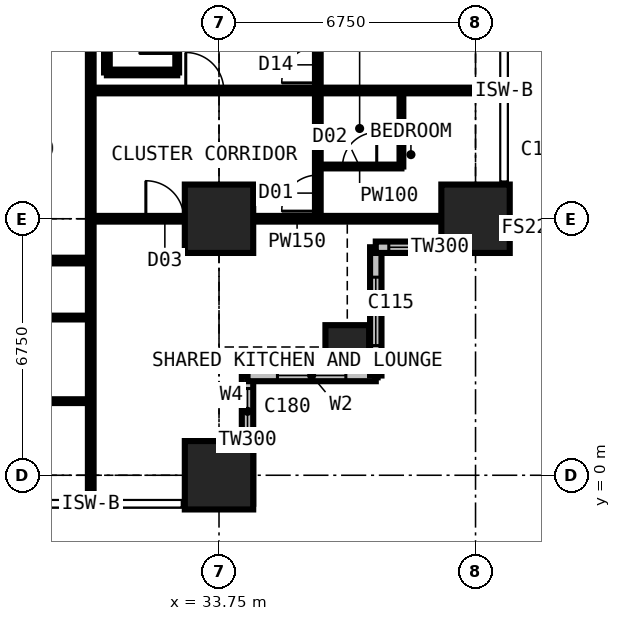
"""IFC4 building model, lengths in metres.
Left out: names, types, materials, properties, quantities, classifications, styles, units other than length and angle.
Written with IfcOpenShell. Run it as: python <this file> out.ifc"""

import sys

from ifc_helpers import new_model, si_unit, direction, frame, frame_2d, origin, origin_2d, place, context, subcontext, project, spatial, rectangle, extrude, element, fill, save


model = new_model("IFC4")
c1 = context("Model", 3, precision=1e-05, world=origin(), true_north=direction((0.0, 1.0)))
c2 = subcontext(c1, "Body", "Model", "MODEL_VIEW")
j1 = project(units=[si_unit("LENGTHUNIT", "METRE"), si_unit("PLANEANGLEUNIT", "RADIAN")], contexts=[c1])
p1 = place(None, origin())
s1 = spatial("IfcSite", under=j1, at=p1, CompositionType="ELEMENT")
p2 = place(p1, origin())
s2 = spatial("IfcBuilding", under=s1, at=p2, CompositionType="ELEMENT")
p3 = place(p2, frame((0.0, 0.0, 90.9)))
s3 = spatial("IfcBuildingStorey", under=s2, at=p3, CompositionType="ELEMENT", Elevation=90.9)
for number, where, z_axis, x_axis in (
    (1, (33.75, 0.0, 0.0), (0.0, 0.0, 1.0), (1.0, 0.0, 0.0)),
    (2, (33.75, 6.75, 0.0), (0.0, 0.0, 1.0), (1.0, 0.0, 0.0)),
):
    element("IfcColumn", number, at=place(p3, frame(where, z_axis=z_axis, x_axis=x_axis)), inside=s3, PredefinedType="COLUMN", context=c2, shape_type="SweptSolid", body=[
        extrude(rectangle(XDim=1.8, YDim=1.8, at=origin_2d()), origin(), (0.0, 0.0, 1.0), 3.6),
    ])
p4 = place(p3, frame((37.125, 3.375, 0.0), z_axis=(0.0, 0.0, 1.0), x_axis=(1.0, 0.0, 0.0)))
e3 = element("IfcColumn", 3, at=p4, inside=s3, PredefinedType="COLUMN", context=c2, shape_type="SweptSolid", body=[
    extrude(rectangle(XDim=1.15, YDim=1.15, at=origin_2d()), origin(), (0.0, 0.0, 1.0), 3.6),
])
p5 = place(p3, frame((40.5, 6.75, 0.0), z_axis=(0.0, 0.0, 1.0), x_axis=(1.0, 0.0, 0.0)))
e4 = element("IfcColumn", 4, at=p5, inside=s3, PredefinedType="COLUMN", context=c2, shape_type="SweptSolid", body=[
    extrude(rectangle(XDim=1.8, YDim=1.8, at=origin_2d()), origin(), (0.0, 0.0, 1.0), 3.6),
])
p6 = place(p3, frame((34.5, -0.75, 0.0), z_axis=(0.0, 0.0, 1.0), x_axis=(0.0, 1.0, 0.0)))
e5 = element("IfcWall", 5, at=p6, inside=s3, PredefinedType="SOLIDWALL", context=c2, shape_type="SweptSolid", body=[
    extrude(rectangle(XDim=3.375, YDim=0.3, at=frame_2d((1.688, 0.0))), origin(), (0.0, 0.0, 1.0), 3.375),
])
p7 = place(p6, frame((1.833, 0.0, 0.9)))
e6 = element("IfcOpeningElement", 6, at=p7, cuts=e5, PredefinedType="OPENING", context=c2, shape_type="SweptSolid", body=[
    extrude(rectangle(XDim=1.2, YDim=1.8, at=frame_2d((0.6, 0.9))), frame((0.0, 0.16, 0.0), z_axis=(0.0, -1.0, 0.0), x_axis=(1.0, 0.0, 0.0)), (0.0, 0.0, 1.0), 0.32),
])
p8 = place(p3, frame((34.5, 2.625, 0.0), z_axis=(0.0, 0.0, 1.0), x_axis=(1.0, 0.0, 0.0)))
e7 = element("IfcWall", 7, at=p8, inside=s3, PredefinedType="SOLIDWALL", context=c2, shape_type="SweptSolid", body=[
    extrude(rectangle(XDim=3.375, YDim=0.3, at=frame_2d((1.688, 0.0))), origin(), (0.0, 0.0, 1.0), 3.375),
])
p9 = place(p8, frame((0.788, 0.0, 0.6)))
e8 = element("IfcOpeningElement", 8, at=p9, cuts=e7, PredefinedType="OPENING", context=c2, shape_type="SweptSolid", body=[
    extrude(rectangle(XDim=1.8, YDim=2.1, at=frame_2d((0.9, 1.05))), frame((0.0, 0.16, 0.0), z_axis=(0.0, -1.0, 0.0), x_axis=(1.0, 0.0, 0.0)), (0.0, 0.0, 1.0), 0.32),
])
p10 = place(p3, frame((37.875, 2.625, 0.0), z_axis=(0.0, 0.0, 1.0), x_axis=(0.0, 1.0, 0.0)))
e9 = element("IfcWall", 9, at=p10, inside=s3, PredefinedType="SOLIDWALL", context=c2, shape_type="SweptSolid", body=[
    extrude(rectangle(XDim=3.375, YDim=0.3, at=frame_2d((1.688, 0.0))), origin(), (0.0, 0.0, 1.0), 3.375),
])
p11 = place(p10, frame((0.788, 0.0, 0.6)))
e10 = element("IfcOpeningElement", 10, at=p11, cuts=e9, PredefinedType="OPENING", context=c2, shape_type="SweptSolid", body=[
    extrude(rectangle(XDim=1.8, YDim=2.1, at=frame_2d((0.9, 1.05))), frame((0.0, 0.16, 0.0), z_axis=(0.0, -1.0, 0.0), x_axis=(1.0, 0.0, 0.0)), (0.0, 0.0, 1.0), 0.32),
])
p12 = place(p3, frame((37.875, 6.0, 0.0), z_axis=(0.0, 0.0, 1.0), x_axis=(1.0, 0.0, 0.0)))
e11 = element("IfcWall", 11, at=p12, inside=s3, PredefinedType="SOLIDWALL", context=c2, shape_type="SweptSolid", body=[
    extrude(rectangle(XDim=3.375, YDim=0.3, at=frame_2d((1.688, 0.0))), origin(), (0.0, 0.0, 1.0), 3.375),
])
p13 = place(p12, frame((0.343, 0.0, 0.9)))
e12 = element("IfcOpeningElement", 12, at=p13, cuts=e11, PredefinedType="OPENING", context=c2, shape_type="SweptSolid", body=[
    extrude(rectangle(XDim=1.2, YDim=1.8, at=frame_2d((0.6, 0.9))), frame((0.0, 0.16, 0.0), z_axis=(0.0, -1.0, 0.0), x_axis=(1.0, 0.0, 0.0)), (0.0, 0.0, 1.0), 0.32),
])
p14 = place(p3, frame((6.75, 4.15, 0.0), z_axis=(0.0, 0.0, 1.0), x_axis=(1.0, 0.0, 0.0)))
e13 = element("IfcWall", 13, at=p14, inside=s3, PredefinedType="PARTITIONING", context=c2, shape_type="SweptSolid", body=[
    extrude(rectangle(XDim=23.625, YDim=0.1, at=frame_2d((11.812, 0.0))), origin(), (0.0, 0.0, 1.0), 3.375),
])
p15 = place(p14, frame((2.85, 0.0, 0.0)))
e14 = element("IfcOpeningElement", 14, at=p15, cuts=e13, PredefinedType="OPENING", context=c2, shape_type="SweptSolid", body=[
    extrude(rectangle(XDim=1.0, YDim=2.2, at=frame_2d((0.5, 1.1))), frame((0.0, 0.06, 0.0), z_axis=(0.0, -1.0, 0.0), x_axis=(1.0, 0.0, 0.0)), (0.0, 0.0, 1.0), 0.12),
])
p16 = place(p14, frame((6.95, 0.0, 0.0)))
e15 = element("IfcOpeningElement", 15, at=p16, cuts=e13, PredefinedType="OPENING", context=c2, shape_type="SweptSolid", body=[
    extrude(rectangle(XDim=0.95, YDim=2.2, at=frame_2d((0.475, 1.1))), frame((0.0, 0.06, 0.0), z_axis=(0.0, -1.0, 0.0), x_axis=(1.0, 0.0, 0.0)), (0.0, 0.0, 1.0), 0.12),
])
p17 = place(p14, frame((10.375, 0.0, 0.0)))
e16 = element("IfcOpeningElement", 16, at=p17, cuts=e13, PredefinedType="OPENING", context=c2, shape_type="SweptSolid", body=[
    extrude(rectangle(XDim=0.95, YDim=2.2, at=frame_2d((0.475, 1.1))), frame((0.0, 0.06, 0.0), z_axis=(0.0, -1.0, 0.0), x_axis=(1.0, 0.0, 0.0)), (0.0, 0.0, 1.0), 0.12),
])
p18 = place(p14, frame((13.7, 0.0, 0.0)))
e17 = element("IfcOpeningElement", 17, at=p18, cuts=e13, PredefinedType="OPENING", context=c2, shape_type="SweptSolid", body=[
    extrude(rectangle(XDim=0.95, YDim=2.2, at=frame_2d((0.475, 1.1))), frame((0.0, 0.06, 0.0), z_axis=(0.0, -1.0, 0.0), x_axis=(1.0, 0.0, 0.0)), (0.0, 0.0, 1.0), 0.12),
])
p19 = place(p14, frame((17.125, 0.0, 0.0)))
e18 = element("IfcOpeningElement", 18, at=p19, cuts=e13, PredefinedType="OPENING", context=c2, shape_type="SweptSolid", body=[
    extrude(rectangle(XDim=0.95, YDim=2.2, at=frame_2d((0.475, 1.1))), frame((0.0, 0.06, 0.0), z_axis=(0.0, -1.0, 0.0), x_axis=(1.0, 0.0, 0.0)), (0.0, 0.0, 1.0), 0.12),
])
p20 = place(p14, frame((20.5, 0.0, 0.0)))
e19 = element("IfcOpeningElement", 19, at=p20, cuts=e13, PredefinedType="OPENING", context=c2, shape_type="SweptSolid", body=[
    extrude(rectangle(XDim=0.95, YDim=2.2, at=frame_2d((0.475, 1.1))), frame((0.0, 0.06, 0.0), z_axis=(0.0, -1.0, 0.0), x_axis=(1.0, 0.0, 0.0)), (0.0, 0.0, 1.0), 0.12),
])
p21 = place(p3, frame((22.988, 5.65, 0.0), z_axis=(0.0, 0.0, 1.0), x_axis=(1.0, 0.0, 0.0)))
e20 = element("IfcWall", 20, at=p21, inside=s3, PredefinedType="PARTITIONING", context=c2, shape_type="SweptSolid", body=[
    extrude(rectangle(XDim=7.387, YDim=0.15, at=frame_2d((3.694, 0.0))), origin(), (0.0, 0.0, 1.0), 3.375),
])
p22 = place(p21, frame((2.15, 0.0, 0.0)))
e21 = element("IfcOpeningElement", 21, at=p22, cuts=e20, PredefinedType="OPENING", context=c2, shape_type="SweptSolid", body=[
    extrude(rectangle(XDim=0.95, YDim=2.2, at=frame_2d((0.475, 1.1))), frame((0.0, 0.085, 0.0), z_axis=(0.0, -1.0, 0.0), x_axis=(1.0, 0.0, 0.0)), (0.0, 0.0, 1.0), 0.17),
])
p23 = place(p3, frame((28.375, 1.95, 0.0), z_axis=(0.0, 0.0, 1.0), x_axis=(1.0, 0.0, 0.0)))
e22 = element("IfcWall", 22, at=p23, inside=s3, PredefinedType="PARTITIONING", context=c2, shape_type="SweptSolid", body=[
    extrude(rectangle(XDim=2.0, YDim=0.1, at=frame_2d((1.0, 0.0))), origin(), (0.0, 0.0, 1.0), 3.375),
])
p24 = place(p3, frame((30.375, -0.734, 0.0), z_axis=(0.0, 0.0, 1.0), x_axis=(0.0, 1.0, 0.0)))
e23 = element("IfcWall", 23, at=p24, inside=s3, PredefinedType="PARTITIONING", context=c2, shape_type="SweptSolid", body=[
    extrude(rectangle(XDim=12.034, YDim=0.15, at=frame_2d((6.017, 0.0))), origin(), (0.0, 0.0, 1.0), 3.375),
])
p25 = place(p3, frame((30.375, 6.75, 0.0), z_axis=(0.0, 0.0, 1.0), x_axis=(1.0, 0.0, 0.0)))
e24 = element("IfcWall", 24, at=p25, inside=s3, PredefinedType="PARTITIONING", context=c2, shape_type="SweptSolid", body=[
    extrude(rectangle(XDim=10.859, YDim=0.15, at=frame_2d((5.429, 0.0))), origin(), (0.0, 0.0, 1.0), 2.877),
])
p26 = place(p25, frame((1.45, 0.0, 0.0)))
e25 = element("IfcOpeningElement", 25, at=p26, cuts=e24, PredefinedType="OPENING", context=c2, shape_type="SweptSolid", body=[
    extrude(rectangle(XDim=1.0, YDim=2.2, at=frame_2d((0.5, 1.1))), frame((0.0, 0.085, 0.0), z_axis=(0.0, -1.0, 0.0), x_axis=(1.0, 0.0, 0.0)), (0.0, 0.0, 1.0), 0.17),
])
p27 = place(p3, frame((30.375, 10.125, 0.0), z_axis=(0.0, 0.0, 1.0), x_axis=(1.0, 0.0, 0.0)))
e26 = element("IfcWall", 26, at=p27, inside=s3, PredefinedType="PARTITIONING", context=c2, shape_type="SweptSolid", body=[
    extrude(rectangle(XDim=10.859, YDim=0.15, at=frame_2d((5.429, 0.0))), origin(), (0.0, 0.0, 1.0), 3.375),
])
p28 = place(p27, frame((2.5, 0.0, 0.0)))
e27 = element("IfcOpeningElement", 27, at=p28, cuts=e26, PredefinedType="OPENING", context=c2, shape_type="SweptSolid", body=[
    extrude(rectangle(XDim=1.0, YDim=2.2, at=frame_2d((0.5, 1.1))), frame((0.0, 0.085, 0.0), z_axis=(0.0, -1.0, 0.0), x_axis=(1.0, 0.0, 0.0)), (0.0, 0.0, 1.0), 0.17),
])
p29 = place(p3, frame((30.8, 10.6, 0.0), z_axis=(0.0, 0.0, 1.0), x_axis=(0.0, 1.0, 0.0)))
e28 = element("IfcWall", 28, at=p29, inside=s3, PredefinedType="PARTITIONING", context=c2, shape_type="SweptSolid", body=[
    extrude(rectangle(XDim=0.7, YDim=0.15, at=frame_2d((0.35, 0.0))), origin(), (0.0, 0.0, 1.0), 3.375),
])
p30 = place(p3, frame((30.8, 10.6, 0.0), z_axis=(0.0, 0.0, 1.0), x_axis=(1.0, 0.0, 0.0)))
e29 = element("IfcWall", 29, at=p30, inside=s3, PredefinedType="PARTITIONING", context=c2, shape_type="SweptSolid", body=[
    extrude(rectangle(XDim=1.85, YDim=0.15, at=frame_2d((0.925, 0.0))), origin(), (0.0, 0.0, 1.0), 3.375),
])
p31 = place(p3, frame((32.65, 10.6, 0.0), z_axis=(0.0, 0.0, 1.0), x_axis=(0.0, 1.0, 0.0)))
e30 = element("IfcWall", 30, at=p31, inside=s3, PredefinedType="SHEAR", context=c2, shape_type="SweptSolid", body=[
    extrude(rectangle(XDim=9.3, YDim=0.1, at=frame_2d((4.65, 0.0))), origin(), (0.0, 0.0, 1.0), 3.375),
])
p32 = place(p31, frame((0.5, 0.0, 0.0)))
e31 = element("IfcOpeningElement", 31, at=p32, cuts=e30, PredefinedType="OPENING", context=c2, shape_type="SweptSolid", body=[
    extrude(rectangle(XDim=1.0, YDim=2.2, at=frame_2d((0.5, 1.1))), frame((0.0, 0.06, 0.0), z_axis=(0.0, -1.0, 0.0), x_axis=(1.0, 0.0, 0.0)), (0.0, 0.0, 1.0), 0.12),
])
p33 = place(p3, frame((36.35, 6.75, 0.0), z_axis=(0.0, 0.0, 1.0), x_axis=(0.0, 1.0, 0.0)))
e32 = element("IfcWall", 32, at=p33, inside=s3, PredefinedType="PARTITIONING", context=c2, shape_type="SweptSolid", body=[
    extrude(rectangle(XDim=20.25, YDim=0.15, at=frame_2d((10.125, 0.0))), origin(), (0.0, 0.0, 1.0), 3.375),
])
p34 = place(p33, frame((0.2, 0.0, 0.0)))
e33 = element("IfcOpeningElement", 33, at=p34, cuts=e32, PredefinedType="OPENING", context=c2, shape_type="SweptSolid", body=[
    extrude(rectangle(XDim=0.95, YDim=2.2, at=frame_2d((0.475, 1.1))), frame((0.0, 0.085, 0.0), z_axis=(0.0, -1.0, 0.0), x_axis=(1.0, 0.0, 0.0)), (0.0, 0.0, 1.0), 0.17),
])
p35 = place(p33, frame((15.1, 0.0, 0.0)))
e34 = element("IfcOpeningElement", 34, at=p35, cuts=e32, PredefinedType="OPENING", context=c2, shape_type="SweptSolid", body=[
    extrude(rectangle(XDim=0.95, YDim=2.2, at=frame_2d((0.475, 1.1))), frame((0.0, 0.085, 0.0), z_axis=(0.0, -1.0, 0.0), x_axis=(1.0, 0.0, 0.0)), (0.0, 0.0, 1.0), 0.17),
])
p36 = place(p33, frame((8.35, 0.0, 0.0)))
e35 = element("IfcOpeningElement", 35, at=p36, cuts=e32, PredefinedType="OPENING", context=c2, shape_type="SweptSolid", body=[
    extrude(rectangle(XDim=0.95, YDim=2.2, at=frame_2d((0.475, 1.1))), frame((0.0, 0.085, 0.0), z_axis=(0.0, -1.0, 0.0), x_axis=(1.0, 0.0, 0.0)), (0.0, 0.0, 1.0), 0.17),
])
p37 = place(p33, frame((3.575, 0.0, 0.0)))
e36 = element("IfcOpeningElement", 36, at=p37, cuts=e32, PredefinedType="OPENING", context=c2, shape_type="SweptSolid", body=[
    extrude(rectangle(XDim=0.95, YDim=2.2, at=frame_2d((0.475, 1.1))), frame((0.0, 0.085, 0.0), z_axis=(0.0, -1.0, 0.0), x_axis=(1.0, 0.0, 0.0)), (0.0, 0.0, 1.0), 0.17),
])
p38 = place(p3, frame((36.35, 8.125, 0.0), z_axis=(0.0, 0.0, 1.0), x_axis=(1.0, 0.0, 0.0)))
e37 = element("IfcWall", 37, at=p38, inside=s3, PredefinedType="PARTITIONING", context=c2, shape_type="SweptSolid", body=[
    extrude(rectangle(XDim=2.2, YDim=0.1, at=frame_2d((1.1, 0.0))), origin(), (0.0, 0.0, 1.0), 3.375),
])
p39 = place(p38, frame((0.65, 0.0, 0.0)))
e38 = element("IfcOpeningElement", 38, at=p39, cuts=e37, PredefinedType="OPENING", context=c2, shape_type="SweptSolid", body=[
    extrude(rectangle(XDim=0.9, YDim=2.2, at=frame_2d((0.45, 1.1))), frame((0.0, 0.06, 0.0), z_axis=(0.0, -1.0, 0.0), x_axis=(1.0, 0.0, 0.0)), (0.0, 0.0, 1.0), 0.12),
])
p40 = place(p3, frame((38.55, 8.125, 0.0), z_axis=(0.0, 0.0, 1.0), x_axis=(0.0, 1.0, 0.0)))
e39 = element("IfcWall", 39, at=p40, inside=s3, PredefinedType="PARTITIONING", context=c2, shape_type="SweptSolid", body=[
    extrude(rectangle(XDim=2.0, YDim=0.1, at=frame_2d((1.0, 0.0))), origin(), (0.0, 0.0, 1.0), 3.375),
])
p41 = place(p7, origin())
e40 = element("IfcWindow", 40, at=p41, inside=s3, PartitioningType="SINGLE_PANEL", PredefinedType="WINDOW", context=c2, shape_type="SweptSolid", body=[
    extrude(rectangle(XDim=1.2, YDim=1.8, at=frame_2d((0.6, 0.9))), frame((0.0, 0.03, 0.0), z_axis=(0.0, -1.0, 0.0), x_axis=(1.0, 0.0, 0.0)), (0.0, 0.0, 1.0), 0.06),
])
fill(e6, e40)
p42 = place(p9, origin())
e41 = element("IfcWindow", 41, at=p42, inside=s3, PartitioningType="SINGLE_PANEL", PredefinedType="WINDOW", context=c2, shape_type="SweptSolid", body=[
    extrude(rectangle(XDim=1.8, YDim=2.1, at=frame_2d((0.9, 1.05))), frame((0.0, 0.03, 0.0), z_axis=(0.0, -1.0, 0.0), x_axis=(1.0, 0.0, 0.0)), (0.0, 0.0, 1.0), 0.06),
])
fill(e8, e41)
p43 = place(p11, origin())
e42 = element("IfcWindow", 42, at=p43, inside=s3, PartitioningType="SINGLE_PANEL", PredefinedType="WINDOW", context=c2, shape_type="SweptSolid", body=[
    extrude(rectangle(XDim=1.8, YDim=2.1, at=frame_2d((0.9, 1.05))), frame((0.0, 0.03, 0.0), z_axis=(0.0, -1.0, 0.0), x_axis=(1.0, 0.0, 0.0)), (0.0, 0.0, 1.0), 0.06),
])
fill(e10, e42)
p44 = place(p13, origin())
e43 = element("IfcWindow", 43, at=p44, inside=s3, PartitioningType="SINGLE_PANEL", PredefinedType="WINDOW", context=c2, shape_type="SweptSolid", body=[
    extrude(rectangle(XDim=1.2, YDim=1.8, at=frame_2d((0.6, 0.9))), frame((0.0, 0.03, 0.0), z_axis=(0.0, -1.0, 0.0), x_axis=(1.0, 0.0, 0.0)), (0.0, 0.0, 1.0), 0.06),
])
fill(e12, e43)
p45 = place(p26, origin())
e44 = element("IfcDoor", 44, at=p45, inside=s3, OperationType="SINGLE_SWING_LEFT", PredefinedType="DOOR", context=c2, shape_type="SweptSolid", body=[
    extrude(rectangle(XDim=1.0, YDim=2.2, at=frame_2d((0.5, 1.1))), frame((0.0, 0.025, 0.0), z_axis=(0.0, -1.0, 0.0), x_axis=(1.0, 0.0, 0.0)), (0.0, 0.0, 1.0), 0.05),
])
fill(e25, e44)
p46 = place(p34, origin())
e45 = element("IfcDoor", 45, at=p46, inside=s3, OperationType="SINGLE_SWING_LEFT", PredefinedType="DOOR", context=c2, shape_type="SweptSolid", body=[
    extrude(rectangle(XDim=0.95, YDim=2.2, at=frame_2d((0.475, 1.1))), frame((0.0, 0.025, 0.0), z_axis=(0.0, -1.0, 0.0), x_axis=(1.0, 0.0, 0.0)), (0.0, 0.0, 1.0), 0.05),
])
fill(e33, e45)
p47 = place(p39, origin())
e46 = element("IfcDoor", 46, at=p47, inside=s3, OperationType="SINGLE_SWING_RIGHT", PredefinedType="DOOR", context=c2, shape_type="SweptSolid", body=[
    extrude(rectangle(XDim=0.9, YDim=2.2, at=frame_2d((0.45, 1.1))), frame((0.0, 0.025, 0.0), z_axis=(0.0, -1.0, 0.0), x_axis=(1.0, 0.0, 0.0)), (0.0, 0.0, 1.0), 0.05),
])
fill(e38, e46)
p48 = place(p28, origin())
e47 = element("IfcDoor", 47, at=p48, inside=s3, OperationType="SINGLE_SWING_LEFT", PredefinedType="DOOR", context=c2, shape_type="SweptSolid", body=[
    extrude(rectangle(XDim=1.0, YDim=2.2, at=frame_2d((0.5, 1.1))), frame((0.0, 0.025, 0.0), z_axis=(0.0, -1.0, 0.0), x_axis=(1.0, 0.0, 0.0)), (0.0, 0.0, 1.0), 0.05),
])
fill(e27, e47)
p49 = place(p37, origin())
e48 = element("IfcDoor", 48, at=p49, inside=s3, OperationType="SINGLE_SWING_LEFT", PredefinedType="DOOR", context=c2, shape_type="SweptSolid", body=[
    extrude(rectangle(XDim=0.95, YDim=2.2, at=frame_2d((0.475, 1.1))), frame((0.0, 0.025, 0.0), z_axis=(0.0, -1.0, 0.0), x_axis=(1.0, 0.0, 0.0)), (0.0, 0.0, 1.0), 0.05),
])
fill(e36, e48)
p50 = place(p32, origin())
e49 = element("IfcDoor", 49, at=p50, inside=s3, OperationType="SINGLE_SWING_LEFT", PredefinedType="DOOR", context=c2, shape_type="SweptSolid", body=[
    extrude(rectangle(XDim=1.0, YDim=2.2, at=frame_2d((0.5, 1.1))), frame((0.0, 0.025, 0.0), z_axis=(0.0, -1.0, 0.0), x_axis=(1.0, 0.0, 0.0)), (0.0, 0.0, 1.0), 0.05),
])
fill(e31, e49)
save(model, sys.argv[1])
